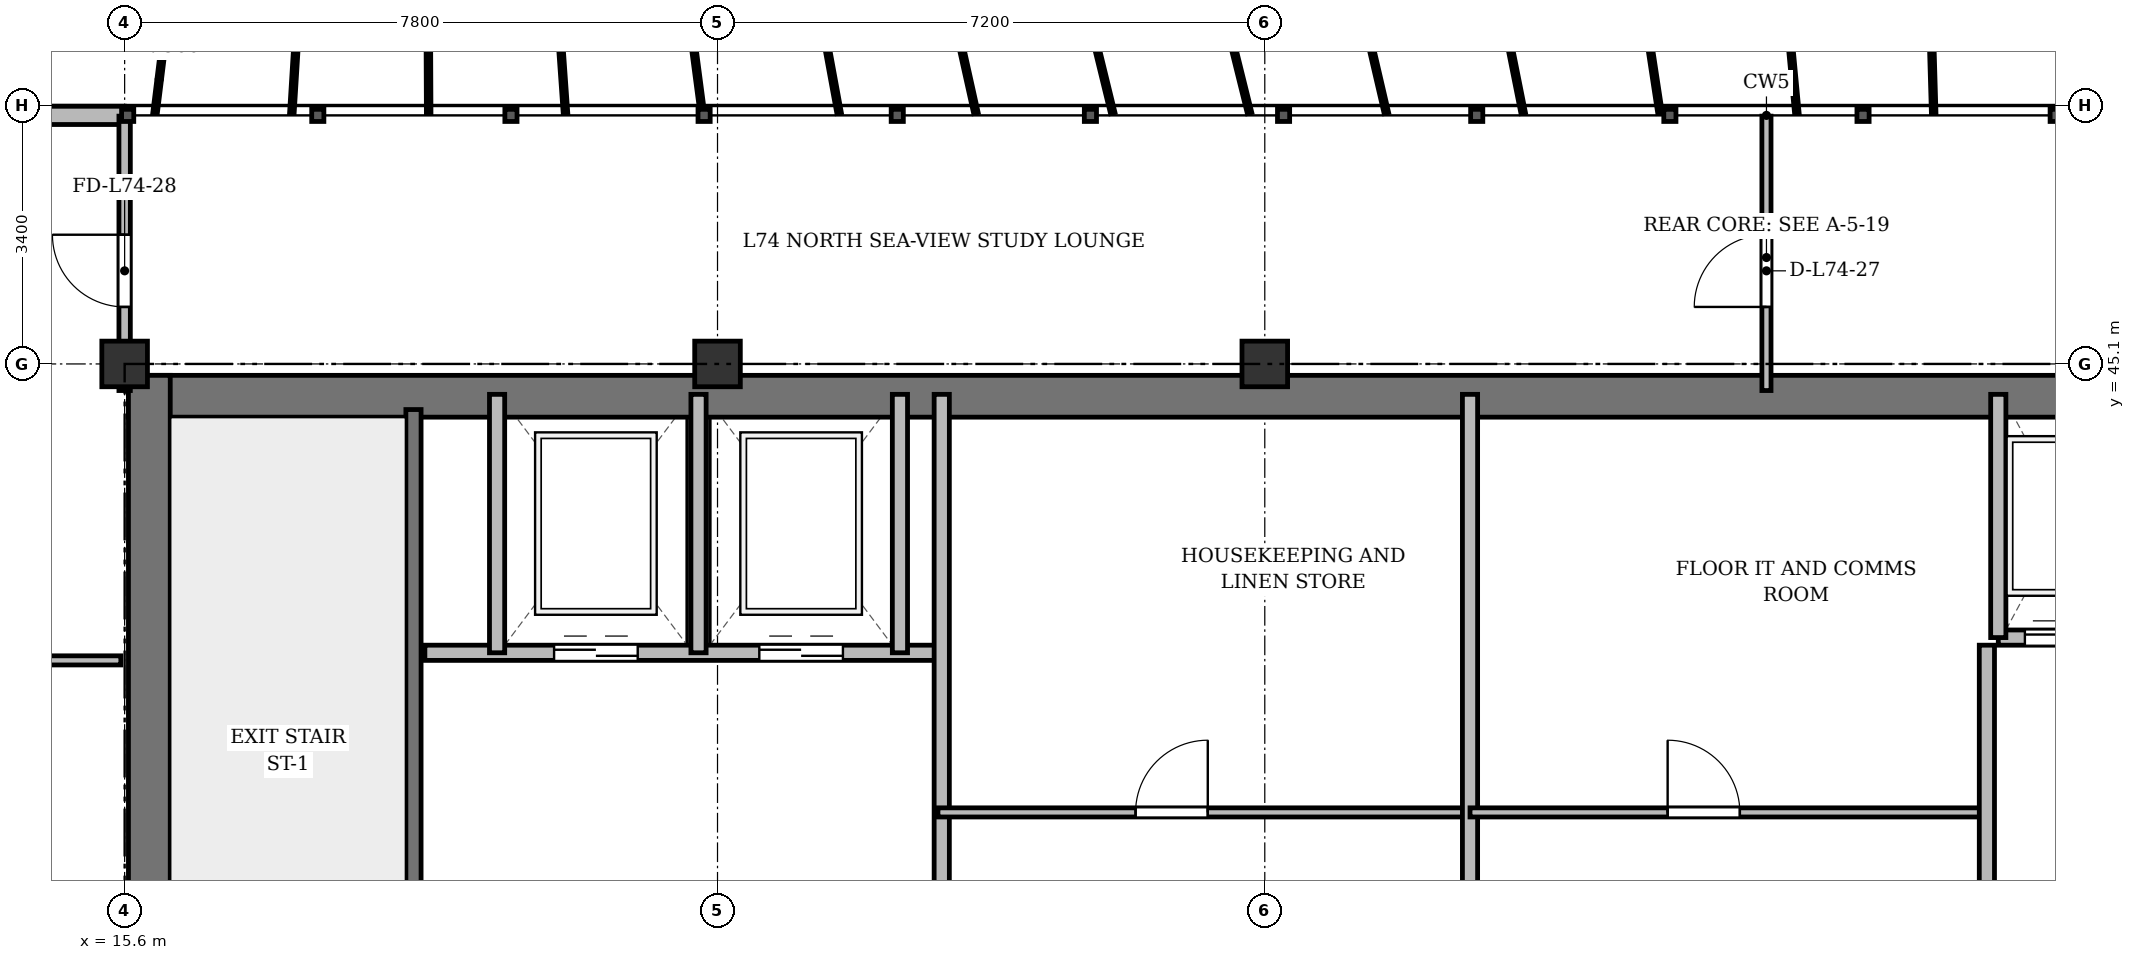
"""IFC4 building model, lengths in metres.
Left out: names, types, materials, properties, quantities, classifications, styles, units other than length and angle.
Written with IfcOpenShell. Run it as: python <this file> out.ifc"""

import sys

from ifc_helpers import new_model, si_unit, direction, frame, frame_2d, origin, origin_2d, place, context, subcontext, project, spatial, rectangle, extrude, source, transform, mapped, element, fill, save


model = new_model("IFC4")
c1 = context("Model", 3, precision=1e-05, world=origin(), true_north=direction((0.0, 1.0)))
c2 = subcontext(c1, "Body", "Model", "MODEL_VIEW")
j1 = project(units=[si_unit("LENGTHUNIT", "METRE"), si_unit("PLANEANGLEUNIT", "RADIAN")], contexts=[c1])
p1 = place(None, origin())
s1 = spatial("IfcSite", under=j1, at=p1, CompositionType="ELEMENT")
p2 = place(p1, origin())
s2 = spatial("IfcBuilding", under=s1, at=p2, CompositionType="ELEMENT")
p3 = place(p2, frame((0.0, 0.0, 284.7)))
s3 = spatial("IfcBuildingStorey", under=s2, at=p3, CompositionType="ELEMENT", Elevation=284.7)
m1 = source(origin(), c2, "Body", "SweptSolid", [
    extrude(rectangle(XDim=0.6, YDim=0.6, at=origin_2d()), origin(), (0.0, 0.0, 1.0), 3.6),
])
for number, where, z_axis, x_axis in (
    (1, (15.6, 45.1, 0.0), (0.0, 0.0, 1.0), (1.0, 0.0, 0.0)),
    (2, (23.4, 45.1, 0.0), (0.0, 0.0, 1.0), (1.0, 0.0, 0.0)),
    (3, (30.6, 45.1, 0.0), (0.0, 0.0, 1.0), (1.0, 0.0, 0.0)),
):
    element("IfcColumn", number, at=place(p3, frame(where, z_axis=z_axis, x_axis=x_axis)), inside=s3, PredefinedType="COLUMN", context=c2, shape_type="MappedRepresentation", body=[
        mapped(m1, transform((0.0, 0.0, 0.0), x_axis=(1.0, 0.0, 0.0), y_axis=(0.0, 1.0, 0.0), z_axis=(0.0, 0.0, 1.0), scale=1.0)),
    ])
p4 = place(p3, frame((11.3, 48.37, 0.0), z_axis=(0.0, 0.0, 1.0), x_axis=(1.0, 0.0, 0.0)))
e4 = element("IfcWall", 4, at=p4, inside=s3, PredefinedType="SOLIDWALL", context=c2, shape_type="SweptSolid", body=[
    extrude(rectangle(XDim=4.3, YDim=0.24, at=frame_2d((2.15, 0.0))), origin(), (0.0, 0.0, 1.0), 3.37),
])
p5 = place(p4, frame((1.46, 0.0, 0.9)))
e5 = element("IfcOpeningElement", 5, at=p5, cuts=e4, PredefinedType="OPENING", context=c2, shape_type="SweptSolid", body=[
    extrude(rectangle(XDim=1.2, YDim=1.65, at=frame_2d((0.6, 0.825))), frame((0.0, 0.13, 0.0), z_axis=(0.0, -1.0, 0.0), x_axis=(1.0, 0.0, 0.0)), (0.0, 0.0, 1.0), 0.26),
])
p6 = place(p3, frame((15.65, 44.675, 0.0), z_axis=(0.0, 0.0, 1.0), x_axis=(1.0, 0.0, 0.0)))
e6 = element("IfcWall", 6, at=p6, inside=s3, PredefinedType="SHEAR", context=c2, shape_type="SweptSolid", body=[
    extrude(rectangle(XDim=43.1, YDim=0.55, at=frame_2d((21.55, 0.0))), origin(), (0.0, 0.0, 1.0), 3.37),
])
p7 = place(p3, frame((15.925, 33.4, 0.0), z_axis=(0.0, 0.0, 1.0), x_axis=(0.0, 1.0, 0.0)))
e7 = element("IfcWall", 7, at=p7, inside=s3, PredefinedType="SHEAR", context=c2, shape_type="SweptSolid", body=[
    extrude(rectangle(XDim=11.55, YDim=0.55, at=frame_2d((5.775, 0.0))), origin(), (0.0, 0.0, 1.0), 3.37),
])
p8 = place(p3, frame((19.4, 33.4, 0.0), z_axis=(0.0, 0.0, 1.0), x_axis=(0.0, 1.0, 0.0)))
e8 = element("IfcWall", 8, at=p8, inside=s3, PredefinedType="SHEAR", context=c2, shape_type="SweptSolid", body=[
    extrude(rectangle(XDim=11.1, YDim=0.2, at=frame_2d((5.55, 0.0))), origin(), (0.0, 0.0, 1.0), 3.37),
])
p9 = place(p8, frame((0.85, 0.0, 0.0)))
e9 = element("IfcOpeningElement", 9, at=p9, cuts=e8, PredefinedType="OPENING", context=c2, shape_type="SweptSolid", body=[
    extrude(rectangle(XDim=1.1, YDim=2.15, at=frame_2d((0.55, 1.075))), frame((0.0, 0.11, 0.0), z_axis=(0.0, -1.0, 0.0), x_axis=(1.0, 0.0, 0.0)), (0.0, 0.0, 1.0), 0.22),
])
p10 = place(p3, frame((19.55, 41.3, 0.0), z_axis=(0.0, 0.0, 1.0), x_axis=(1.0, 0.0, 0.0)))
e10 = element("IfcWall", 10, at=p10, inside=s3, PredefinedType="SOLIDWALL", context=c2, shape_type="SweptSolid", body=[
    extrude(rectangle(XDim=6.75, YDim=0.2, at=frame_2d((3.375, 0.0))), origin(), (0.0, 0.0, 1.0), 3.37),
])
p11 = place(p10, frame((1.7, 0.0, 0.0)))
e11 = element("IfcOpeningElement", 11, at=p11, cuts=e10, PredefinedType="OPENING", context=c2, shape_type="SweptSolid", body=[
    extrude(rectangle(XDim=1.1, YDim=2.15, at=frame_2d((0.55, 1.075))), frame((0.0, 0.11, 0.0), z_axis=(0.0, -1.0, 0.0), x_axis=(1.0, 0.0, 0.0)), (0.0, 0.0, 1.0), 0.22),
])
p12 = place(p10, frame((4.4, 0.0, 0.0)))
e12 = element("IfcOpeningElement", 12, at=p12, cuts=e10, PredefinedType="OPENING", context=c2, shape_type="SweptSolid", body=[
    extrude(rectangle(XDim=1.1, YDim=2.15, at=frame_2d((0.55, 1.075))), frame((0.0, 0.11, 0.0), z_axis=(0.0, -1.0, 0.0), x_axis=(1.0, 0.0, 0.0)), (0.0, 0.0, 1.0), 0.22),
])
for number, where, z_axis, x_axis in (
    (13, (20.5, 41.3, 0.0), (0.0, 0.0, 1.0), (0.0, 1.0, 0.0)),
    (14, (23.15, 41.3, 0.0), (0.0, 0.0, 1.0), (0.0, 1.0, 0.0)),
    (15, (25.8, 41.3, 0.0), (0.0, 0.0, 1.0), (0.0, 1.0, 0.0)),
):
    element("IfcWall", number, at=place(p3, frame(where, z_axis=z_axis, x_axis=x_axis)), inside=s3, PredefinedType="SOLIDWALL", context=c2, shape_type="SweptSolid", body=[
        extrude(rectangle(XDim=3.4, YDim=0.2, at=frame_2d((1.7, 0.0))), origin(), (0.0, 0.0, 1.0), 3.37),
    ])
p13 = place(p3, frame((26.35, 33.4, 0.0), z_axis=(0.0, 0.0, 1.0), x_axis=(0.0, 1.0, 0.0)))
e16 = element("IfcWall", 16, at=p13, inside=s3, PredefinedType="SOLIDWALL", context=c2, shape_type="SweptSolid", body=[
    extrude(rectangle(XDim=11.3, YDim=0.2, at=frame_2d((5.65, 0.0))), origin(), (0.0, 0.0, 1.0), 2.92),
])
p14 = place(p3, frame((26.3, 39.2, 0.0), z_axis=(0.0, 0.0, 1.0), x_axis=(1.0, 0.0, 0.0)))
e17 = element("IfcWall", 17, at=p14, inside=s3, PredefinedType="PARTITIONING", context=c2, shape_type="SweptSolid", body=[
    extrude(rectangle(XDim=7.0, YDim=0.12, at=frame_2d((3.5, 0.0))), origin(), (0.0, 0.0, 1.0), 2.87),
])
p15 = place(p14, frame((2.6, 0.0, 0.0)))
e18 = element("IfcOpeningElement", 18, at=p15, cuts=e17, PredefinedType="OPENING", context=c2, shape_type="SweptSolid", body=[
    extrude(rectangle(XDim=0.95, YDim=2.15, at=frame_2d((0.475, 1.075))), frame((0.0, 0.07, 0.0), z_axis=(0.0, -1.0, 0.0), x_axis=(1.0, 0.0, 0.0)), (0.0, 0.0, 1.0), 0.14),
])
p16 = place(p3, frame((33.3, 33.4, 0.0), z_axis=(0.0, 0.0, 1.0), x_axis=(0.0, 1.0, 0.0)))
e19 = element("IfcWall", 19, at=p16, inside=s3, PredefinedType="SOLIDWALL", context=c2, shape_type="SweptSolid", body=[
    extrude(rectangle(XDim=11.3, YDim=0.2, at=frame_2d((5.65, 0.0))), origin(), (0.0, 0.0, 1.0), 2.92),
])
p17 = place(p3, frame((33.3, 39.2, 0.0), z_axis=(0.0, 0.0, 1.0), x_axis=(1.0, 0.0, 0.0)))
e20 = element("IfcWall", 20, at=p17, inside=s3, PredefinedType="PARTITIONING", context=c2, shape_type="SweptSolid", body=[
    extrude(rectangle(XDim=6.8, YDim=0.12, at=frame_2d((3.4, 0.0))), origin(), (0.0, 0.0, 1.0), 3.37),
])
p18 = place(p17, frame((2.6, 0.0, 0.0)))
e21 = element("IfcOpeningElement", 21, at=p18, cuts=e20, PredefinedType="OPENING", context=c2, shape_type="SweptSolid", body=[
    extrude(rectangle(XDim=0.95, YDim=2.15, at=frame_2d((0.475, 1.075))), frame((0.0, 0.07, 0.0), z_axis=(0.0, -1.0, 0.0), x_axis=(1.0, 0.0, 0.0)), (0.0, 0.0, 1.0), 0.14),
])
p19 = place(p3, frame((40.1, 33.4, 0.0), z_axis=(0.0, 0.0, 1.0), x_axis=(0.0, 1.0, 0.0)))
e22 = element("IfcWall", 22, at=p19, inside=s3, PredefinedType="SOLIDWALL", context=c2, shape_type="SweptSolid", body=[
    extrude(rectangle(XDim=8.0, YDim=0.2, at=frame_2d((4.0, 0.0))), origin(), (0.0, 0.0, 1.0), 2.92),
])
p20 = place(p3, frame((40.25, 41.5, 0.0), z_axis=(0.0, 0.0, 1.0), x_axis=(1.0, 0.0, 0.0)))
e23 = element("IfcWall", 23, at=p20, inside=s3, PredefinedType="SOLIDWALL", context=c2, shape_type="SweptSolid", body=[
    extrude(rectangle(XDim=6.9, YDim=0.2, at=frame_2d((3.45, 0.0))), origin(), (0.0, 0.0, 1.0), 3.37),
])
p21 = place(p20, frame((0.35, 0.0, 0.0)))
e24 = element("IfcOpeningElement", 24, at=p21, cuts=e23, PredefinedType="OPENING", context=c2, shape_type="SweptSolid", body=[
    extrude(rectangle(XDim=1.05, YDim=2.15, at=frame_2d((0.525, 1.075))), frame((0.0, 0.11, 0.0), z_axis=(0.0, -1.0, 0.0), x_axis=(1.0, 0.0, 0.0)), (0.0, 0.0, 1.0), 0.22),
])
p22 = place(p20, frame((2.05, 0.0, 0.0)))
e25 = element("IfcOpeningElement", 25, at=p22, cuts=e23, PredefinedType="OPENING", context=c2, shape_type="SweptSolid", body=[
    extrude(rectangle(XDim=1.05, YDim=2.15, at=frame_2d((0.525, 1.075))), frame((0.0, 0.11, 0.0), z_axis=(0.0, -1.0, 0.0), x_axis=(1.0, 0.0, 0.0)), (0.0, 0.0, 1.0), 0.22),
])
p23 = place(p20, frame((3.75, 0.0, 0.0)))
e26 = element("IfcOpeningElement", 26, at=p23, cuts=e23, PredefinedType="OPENING", context=c2, shape_type="SweptSolid", body=[
    extrude(rectangle(XDim=1.05, YDim=2.15, at=frame_2d((0.525, 1.075))), frame((0.0, 0.11, 0.0), z_axis=(0.0, -1.0, 0.0), x_axis=(1.0, 0.0, 0.0)), (0.0, 0.0, 1.0), 0.22),
])
p24 = place(p20, frame((5.45, 0.0, 0.0)))
e27 = element("IfcOpeningElement", 27, at=p24, cuts=e23, PredefinedType="OPENING", context=c2, shape_type="SweptSolid", body=[
    extrude(rectangle(XDim=1.05, YDim=2.15, at=frame_2d((0.525, 1.075))), frame((0.0, 0.11, 0.0), z_axis=(0.0, -1.0, 0.0), x_axis=(1.0, 0.0, 0.0)), (0.0, 0.0, 1.0), 0.22),
])
p25 = place(p3, frame((40.25, 41.5, 0.0), z_axis=(0.0, 0.0, 1.0), x_axis=(0.0, 1.0, 0.0)))
e28 = element("IfcWall", 28, at=p25, inside=s3, PredefinedType="SOLIDWALL", context=c2, shape_type="SweptSolid", body=[
    extrude(rectangle(XDim=3.2, YDim=0.2, at=frame_2d((1.6, 0.0))), origin(), (0.0, 0.0, 1.0), 3.37),
])
p26 = place(p3, frame((8.5, 41.2, 0.0), z_axis=(0.0, 0.0, 1.0), x_axis=(1.0, 0.0, 0.0)))
e29 = element("IfcWall", 29, at=p26, inside=s3, PredefinedType="PARTITIONING", context=c2, shape_type="SweptSolid", body=[
    extrude(rectangle(XDim=7.05, YDim=0.12, at=frame_2d((3.525, 0.0))), origin(), (0.0, 0.0, 1.0), 2.87),
])
p27 = place(p26, frame((2.958, 0.0, 0.0)))
e30 = element("IfcOpeningElement", 30, at=p27, cuts=e29, PredefinedType="OPENING", context=c2, shape_type="SweptSolid", body=[
    extrude(rectangle(XDim=0.95, YDim=2.15, at=frame_2d((0.475, 1.075))), frame((0.0, 0.07, 0.0), z_axis=(0.0, -1.0, 0.0), x_axis=(1.0, 0.0, 0.0)), (0.0, 0.0, 1.0), 0.14),
])
p28 = place(p3, frame((37.2, 44.75, 0.0), z_axis=(0.0, 0.0, 1.0), x_axis=(0.0, 1.0, 0.0)))
e31 = element("IfcWall", 31, at=p28, inside=s3, PredefinedType="PARTITIONING", context=c2, shape_type="SweptSolid", body=[
    extrude(rectangle(XDim=3.61, YDim=0.12, at=frame_2d((1.805, 0.0))), origin(), (0.0, 0.0, 1.0), 2.92),
])
p29 = place(p28, frame((1.1, 0.0, 0.0)))
e32 = element("IfcOpeningElement", 32, at=p29, cuts=e31, PredefinedType="OPENING", context=c2, shape_type="SweptSolid", body=[
    extrude(rectangle(XDim=0.95, YDim=2.15, at=frame_2d((0.475, 1.075))), frame((0.0, 0.07, 0.0), z_axis=(0.0, -1.0, 0.0), x_axis=(1.0, 0.0, 0.0)), (0.0, 0.0, 1.0), 0.14),
])
p30 = place(p3, frame((15.6, 44.75, 0.0), z_axis=(0.0, 0.0, 1.0), x_axis=(0.0, 1.0, 0.0)))
e33 = element("IfcWall", 33, at=p30, inside=s3, PredefinedType="PARTITIONING", context=c2, shape_type="SweptSolid", body=[
    extrude(rectangle(XDim=3.61, YDim=0.15, at=frame_2d((1.805, 0.0))), origin(), (0.0, 0.0, 1.0), 2.87),
])
p31 = place(p30, frame((1.1, 0.0, 0.0)))
e34 = element("IfcOpeningElement", 34, at=p31, cuts=e33, PredefinedType="OPENING", context=c2, shape_type="SweptSolid", body=[
    extrude(rectangle(XDim=0.95, YDim=2.15, at=frame_2d((0.475, 1.075))), frame((0.0, 0.085, 0.0), z_axis=(0.0, -1.0, 0.0), x_axis=(1.0, 0.0, 0.0)), (0.0, 0.0, 1.0), 0.17),
])
m2 = source(origin(), c2, "Body", "SweptSolid", [
    extrude(rectangle(XDim=1.1, YDim=2.15, at=frame_2d((0.55, 1.075))), frame((0.0, 0.025, 0.0), z_axis=(0.0, -1.0, 0.0), x_axis=(1.0, 0.0, 0.0)), (0.0, 0.0, 1.0), 0.05),
])
p32 = place(p11, origin())
e35 = element("IfcDoor", 35, at=p32, inside=s3, OperationType="DOUBLE_DOOR_SLIDING", PredefinedType="DOOR", context=c2, shape_type="MappedRepresentation", body=[
    mapped(m2, transform((0.0, 0.0, 0.0), x_axis=(1.0, 0.0, 0.0), y_axis=(0.0, 1.0, 0.0), z_axis=(0.0, 0.0, 1.0), scale=1.0)),
])
fill(e11, e35)
p33 = place(p12, origin())
e36 = element("IfcDoor", 36, at=p33, inside=s3, OperationType="DOUBLE_DOOR_SLIDING", PredefinedType="DOOR", context=c2, shape_type="MappedRepresentation", body=[
    mapped(m2, transform((0.0, 0.0, 0.0), x_axis=(1.0, 0.0, 0.0), y_axis=(0.0, 1.0, 0.0), z_axis=(0.0, 0.0, 1.0), scale=1.0)),
])
fill(e12, e36)
m3 = source(origin(), c2, "Body", "SweptSolid", [
    extrude(rectangle(XDim=0.95, YDim=2.15, at=frame_2d((0.475, 1.075))), frame((0.0, 0.025, 0.0), z_axis=(0.0, -1.0, 0.0), x_axis=(1.0, 0.0, 0.0)), (0.0, 0.0, 1.0), 0.05),
])
p34 = place(p15, origin())
e37 = element("IfcDoor", 37, at=p34, inside=s3, OperationType="SINGLE_SWING_RIGHT", PredefinedType="DOOR", context=c2, shape_type="MappedRepresentation", body=[
    mapped(m3, transform((0.0, 0.0, 0.0), x_axis=(1.0, 0.0, 0.0), y_axis=(0.0, 1.0, 0.0), z_axis=(0.0, 0.0, 1.0), scale=1.0)),
])
fill(e18, e37)
p35 = place(p18, origin())
e38 = element("IfcDoor", 38, at=p35, inside=s3, OperationType="SINGLE_SWING_LEFT", PredefinedType="DOOR", context=c2, shape_type="MappedRepresentation", body=[
    mapped(m3, transform((0.0, 0.0, 0.0), x_axis=(1.0, 0.0, 0.0), y_axis=(0.0, 1.0, 0.0), z_axis=(0.0, 0.0, 1.0), scale=1.0)),
])
fill(e21, e38)
m4 = source(origin(), c2, "Body", "SweptSolid", [
    extrude(rectangle(XDim=1.05, YDim=2.15, at=frame_2d((0.525, 1.075))), frame((0.0, 0.025, 0.0), z_axis=(0.0, -1.0, 0.0), x_axis=(1.0, 0.0, 0.0)), (0.0, 0.0, 1.0), 0.05),
])
p36 = place(p21, origin())
e39 = element("IfcDoor", 39, at=p36, inside=s3, OperationType="DOUBLE_DOOR_SLIDING", PredefinedType="DOOR", context=c2, shape_type="MappedRepresentation", body=[
    mapped(m4, transform((0.0, 0.0, 0.0), x_axis=(1.0, 0.0, 0.0), y_axis=(0.0, 1.0, 0.0), z_axis=(0.0, 0.0, 1.0), scale=1.0)),
])
fill(e24, e39)
p37 = place(p29, origin())
e40 = element("IfcDoor", 40, at=p37, inside=s3, OperationType="SINGLE_SWING_LEFT", PredefinedType="DOOR", context=c2, shape_type="MappedRepresentation", body=[
    mapped(m3, transform((0.0, 0.0, 0.0), x_axis=(1.0, 0.0, 0.0), y_axis=(0.0, 1.0, 0.0), z_axis=(0.0, 0.0, 1.0), scale=1.0)),
])
fill(e32, e40)
p38 = place(p31, origin())
e41 = element("IfcDoor", 41, at=p38, inside=s3, OperationType="SINGLE_SWING_RIGHT", PredefinedType="DOOR", context=c2, shape_type="MappedRepresentation", body=[
    mapped(m3, transform((0.0, 0.0, 0.0), x_axis=(1.0, 0.0, 0.0), y_axis=(0.0, 1.0, 0.0), z_axis=(0.0, 0.0, 1.0), scale=1.0)),
])
fill(e34, e41)
save(model, sys.argv[1])
